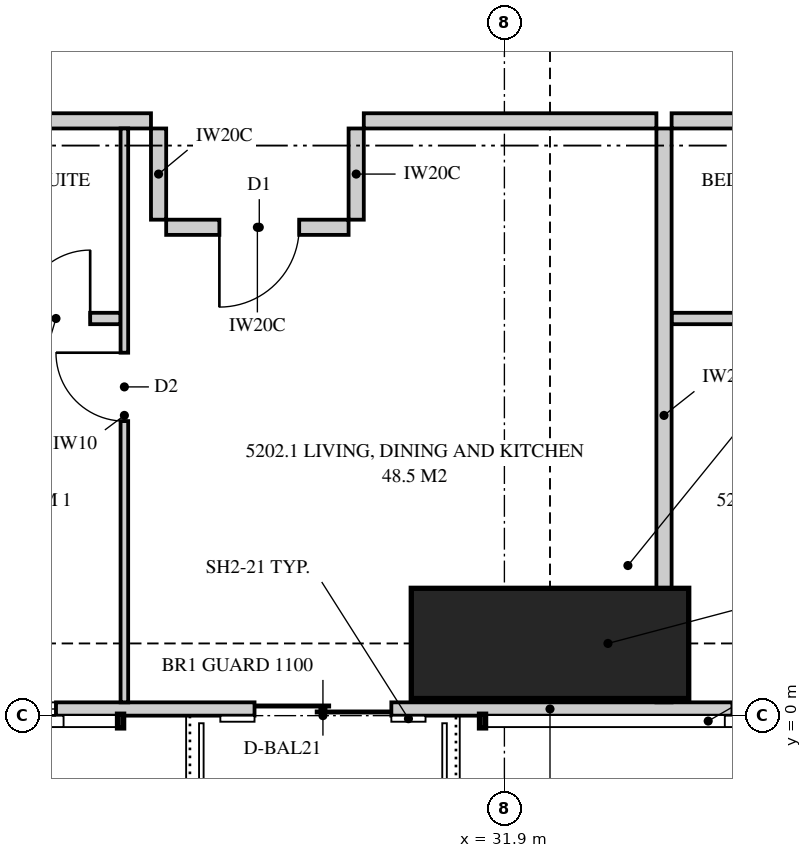
"""IFC4 building model, lengths in metres.
Left out: names, types, materials, properties, quantities, classifications, styles, units other than length and angle.
Written with IfcOpenShell. Run it as: python <this file> out.ifc"""

import sys

from ifc_helpers import new_model, si_unit, direction, frame, frame_2d, origin, origin_2d, place, context, subcontext, project, spatial, polyline, rectangle, outline, extrude, element, fill, save


model = new_model("IFC4")
c1 = context("Model", 3, precision=1e-05, world=origin(), true_north=direction((0.0, 1.0)))
c2 = subcontext(c1, "Body", "Model", "MODEL_VIEW")
j1 = project(units=[si_unit("LENGTHUNIT", "METRE"), si_unit("PLANEANGLEUNIT", "RADIAN")], contexts=[c1])
p1 = place(None, origin())
s1 = spatial("IfcSite", under=j1, at=p1, CompositionType="ELEMENT")
p2 = place(p1, origin())
s2 = spatial("IfcBuilding", under=s1, at=p2, CompositionType="ELEMENT")
p3 = place(p2, frame((0.0, 0.0, 191.2)))
s3 = spatial("IfcBuildingStorey", under=s2, at=p3, CompositionType="ELEMENT", Elevation=191.2)
p4 = place(p3, frame((32.5, 0.95, 0.0), z_axis=(0.0, 0.0, 1.0), x_axis=(0.0, 1.0, 0.0)))
e1 = element("IfcColumn", 1, at=p4, inside=s3, PredefinedType="COLUMN", context=c2, shape_type="SweptSolid", body=[
    extrude(rectangle(XDim=1.45, YDim=3.65, at=origin_2d()), origin(), (0.0, 0.0, 1.0), 3.35),
])
p5 = place(p3, frame((15.051, 0.087, 0.0), z_axis=(0.0, 0.0, 1.0), x_axis=(1.0, 0.0, 0.0)))
e2 = element("IfcWall", 2, at=p5, inside=s3, PredefinedType="SOLIDWALL", context=c2, shape_type="SweptSolid", body=[
    extrude(outline(polyline([(0.0, 0.0), (34.897, 0.0), (34.897, 3.11), (27.91, 3.11), (27.91, 2.15), (27.836, 2.15), (27.836, 3.11), (27.699, 3.11), (27.699, 2.15), (7.199, 2.15), (7.199, 3.11), (7.062, 3.11), (7.062, 2.15), (6.987, 2.15), (6.987, 3.11), (0.0, 3.11), (0.0, 0.0)])), frame((0.0, 0.087, 0.0), z_axis=(0.0, -1.0, 0.0), x_axis=(1.0, 0.0, 0.0)), (0.0, 0.0, 1.0), 0.175),
])
p6 = place(p5, frame((2.84, 0.0, 0.4)))
e3 = element("IfcOpeningElement", 3, at=p6, cuts=e2, PredefinedType="OPENING", context=c2, shape_type="SweptSolid", body=[
    extrude(rectangle(XDim=2.4, YDim=1.7, at=frame_2d((1.2, 0.85))), frame((0.0, 0.097, 0.0), z_axis=(0.0, -1.0, 0.0), x_axis=(1.0, 0.0, 0.0)), (0.0, 0.0, 1.0), 0.195),
])
p7 = place(p5, frame((9.149, 0.0, 0.4)))
e4 = element("IfcOpeningElement", 4, at=p7, cuts=e2, PredefinedType="OPENING", context=c2, shape_type="SweptSolid", body=[
    extrude(rectangle(XDim=1.8, YDim=1.7, at=frame_2d((0.9, 0.85))), frame((0.0, 0.097, 0.0), z_axis=(0.0, -1.0, 0.0), x_axis=(1.0, 0.0, 0.0)), (0.0, 0.0, 1.0), 0.195),
])
p8 = place(p5, frame((13.561, 0.0, 0.0)))
e5 = element("IfcOpeningElement", 5, at=p8, cuts=e2, PredefinedType="OPENING", context=c2, shape_type="SweptSolid", body=[
    extrude(rectangle(XDim=1.8, YDim=2.1, at=frame_2d((0.9, 1.05))), frame((0.0, 0.097, 0.0), z_axis=(0.0, -1.0, 0.0), x_axis=(1.0, 0.0, 0.0)), (0.0, 0.0, 1.0), 0.195),
])
p9 = place(p5, frame((19.849, 0.0, 0.4)))
e6 = element("IfcOpeningElement", 6, at=p9, cuts=e2, PredefinedType="OPENING", context=c2, shape_type="SweptSolid", body=[
    extrude(rectangle(XDim=1.8, YDim=1.7, at=frame_2d((0.9, 0.85))), frame((0.0, 0.097, 0.0), z_axis=(0.0, -1.0, 0.0), x_axis=(1.0, 0.0, 0.0)), (0.0, 0.0, 1.0), 0.195),
])
p10 = place(p5, frame((23.449, 0.0, 0.4)))
e7 = element("IfcOpeningElement", 7, at=p10, cuts=e2, PredefinedType="OPENING", context=c2, shape_type="SweptSolid", body=[
    extrude(rectangle(XDim=1.8, YDim=1.7, at=frame_2d((0.9, 0.85))), frame((0.0, 0.097, 0.0), z_axis=(0.0, -1.0, 0.0), x_axis=(1.0, 0.0, 0.0)), (0.0, 0.0, 1.0), 0.195),
])
p11 = place(p5, frame((29.636, 0.0, 0.4)))
e8 = element("IfcOpeningElement", 8, at=p11, cuts=e2, PredefinedType="OPENING", context=c2, shape_type="SweptSolid", body=[
    extrude(rectangle(XDim=1.8, YDim=1.7, at=frame_2d((0.9, 0.85))), frame((0.0, 0.097, 0.0), z_axis=(0.0, -1.0, 0.0), x_axis=(1.0, 0.0, 0.0)), (0.0, 0.0, 1.0), 0.195),
])
p12 = place(p5, frame((32.56, 0.0, 0.4)))
e9 = element("IfcOpeningElement", 9, at=p12, cuts=e2, PredefinedType="OPENING", context=c2, shape_type="SweptSolid", body=[
    extrude(rectangle(XDim=1.8, YDim=1.7, at=frame_2d((0.9, 0.85))), frame((0.0, 0.097, 0.0), z_axis=(0.0, -1.0, 0.0), x_axis=(1.0, 0.0, 0.0)), (0.0, 0.0, 1.0), 0.195),
])
p13 = place(p3, frame((34.0, 0.175, 0.0), z_axis=(0.0, 0.0, 1.0), x_axis=(0.0, 1.0, 0.0)))
e10 = element("IfcWall", 10, at=p13, inside=s3, PredefinedType="PARTITIONING", context=c2, shape_type="SweptSolid", body=[
    extrude(outline(polyline([(0.0, 0.0), (7.55, 0.0), (7.55, 3.11), (1.685, 3.11), (1.685, 2.15), (0.0, 2.15), (0.0, 3.11), (0.0, 0.0)])), frame((0.0, 0.1, 0.0), z_axis=(0.0, -1.0, 0.0), x_axis=(1.0, 0.0, 0.0)), (0.0, 0.0, 1.0), 0.2),
])
p14 = place(p3, frame((23.4, 7.825, 0.0), z_axis=(0.0, 0.0, 1.0), x_axis=(1.0, 0.0, 0.0)))
e11 = element("IfcWall", 11, at=p14, inside=s3, PredefinedType="PARTITIONING", context=c2, shape_type="SweptSolid", body=[
    extrude(rectangle(XDim=3.85, YDim=0.2, at=frame_2d((1.925, 0.0))), origin(), (0.0, 0.0, 1.0), 3.11),
])
p15 = place(p3, frame((26.9, 0.175, 0.0), z_axis=(0.0, 0.0, 1.0), x_axis=(0.0, 1.0, 0.0)))
e12 = element("IfcWall", 12, at=p15, inside=s3, PredefinedType="PARTITIONING", context=c2, shape_type="SweptSolid", body=[
    extrude(outline(polyline([(0.0, 0.0), (7.55, 0.0), (7.55, 3.11), (1.635, 3.11), (1.635, 2.15), (0.0, 2.15), (0.0, 3.11), (0.0, 0.0)])), frame((0.0, 0.05, 0.0), z_axis=(0.0, -1.0, 0.0), x_axis=(1.0, 0.0, 0.0)), (0.0, 0.0, 1.0), 0.1),
])
p16 = place(p15, frame((3.7, 0.0, 0.0)))
e13 = element("IfcOpeningElement", 13, at=p16, cuts=e12, PredefinedType="OPENING", context=c2, shape_type="SweptSolid", body=[
    extrude(rectangle(XDim=0.9, YDim=2.1, at=frame_2d((0.45, 1.05))), frame((0.0, 0.06, 0.0), z_axis=(0.0, -1.0, 0.0), x_axis=(1.0, 0.0, 0.0)), (0.0, 0.0, 1.0), 0.12),
])
p17 = place(p3, frame((23.4, 5.225, 0.0), z_axis=(0.0, 0.0, 1.0), x_axis=(1.0, 0.0, 0.0)))
e14 = element("IfcWall", 14, at=p17, inside=s3, PredefinedType="PLUMBINGWALL", context=c2, shape_type="SweptSolid", body=[
    extrude(rectangle(XDim=3.45, YDim=0.15, at=frame_2d((1.725, 0.0))), origin(), (0.0, 0.0, 1.0), 3.11),
])
p18 = place(p17, frame((2.15, 0.0, 0.0)))
e15 = element("IfcOpeningElement", 15, at=p18, cuts=e14, PredefinedType="OPENING", context=c2, shape_type="SweptSolid", body=[
    extrude(rectangle(XDim=0.9, YDim=2.1, at=frame_2d((0.45, 1.05))), frame((0.0, 0.085, 0.0), z_axis=(0.0, -1.0, 0.0), x_axis=(1.0, 0.0, 0.0)), (0.0, 0.0, 1.0), 0.17),
])
p19 = place(p3, frame((34.1, 7.825, 0.0), z_axis=(0.0, 0.0, 1.0), x_axis=(1.0, 0.0, 0.0)))
e16 = element("IfcWall", 16, at=p19, inside=s3, PredefinedType="PARTITIONING", context=c2, shape_type="SweptSolid", body=[
    extrude(outline(polyline([(0.0, 0.0), (11.85, 0.0), (11.85, 3.11), (8.987, 3.11), (8.987, 2.541), (8.312, 2.541), (8.312, 3.11), (0.0, 3.11), (0.0, 0.0)])), frame((0.0, 0.1, 0.0), z_axis=(0.0, -1.0, 0.0), x_axis=(1.0, 0.0, 0.0)), (0.0, 0.0, 1.0), 0.2),
])
p20 = place(p19, frame((8.9, 0.0, 0.0)))
e17 = element("IfcOpeningElement", 17, at=p20, cuts=e16, PredefinedType="OPENING", context=c2, shape_type="SweptSolid", body=[
    extrude(rectangle(XDim=1.05, YDim=2.2, at=frame_2d((0.525, 1.1))), frame((0.0, 0.11, 0.0), z_axis=(0.0, -1.0, 0.0), x_axis=(1.0, 0.0, 0.0)), (0.0, 0.0, 1.0), 0.22),
])
p21 = place(p3, frame((34.1, 5.225, 0.0), z_axis=(0.0, 0.0, 1.0), x_axis=(1.0, 0.0, 0.0)))
e18 = element("IfcWall", 18, at=p21, inside=s3, PredefinedType="PLUMBINGWALL", context=c2, shape_type="SweptSolid", body=[
    extrude(rectangle(XDim=3.45, YDim=0.15, at=frame_2d((1.725, 0.0))), origin(), (0.0, 0.0, 1.0), 3.11),
])
p22 = place(p21, frame((2.15, 0.0, 0.0)))
e19 = element("IfcOpeningElement", 19, at=p22, cuts=e18, PredefinedType="OPENING", context=c2, shape_type="SweptSolid", body=[
    extrude(rectangle(XDim=0.9, YDim=2.1, at=frame_2d((0.45, 1.05))), frame((0.0, 0.085, 0.0), z_axis=(0.0, -1.0, 0.0), x_axis=(1.0, 0.0, 0.0)), (0.0, 0.0, 1.0), 0.17),
])
p23 = place(p3, frame((30.05, 7.825, 0.0), z_axis=(0.0, 0.0, 1.0), x_axis=(1.0, 0.0, 0.0)))
e20 = element("IfcWall", 20, at=p23, inside=s3, PredefinedType="PARTITIONING", context=c2, shape_type="SweptSolid", body=[
    extrude(outline(polyline([(0.0, 0.0), (3.85, 0.0), (3.85, 3.11), (2.787, 3.11), (2.787, 2.541), (2.113, 2.541), (2.113, 3.11), (0.0, 3.11), (0.0, 0.0)])), frame((0.0, 0.1, 0.0), z_axis=(0.0, -1.0, 0.0), x_axis=(1.0, 0.0, 0.0)), (0.0, 0.0, 1.0), 0.2),
])
p24 = place(p3, frame((27.45, 6.425, 0.0), z_axis=(0.0, 0.0, 1.0), x_axis=(1.0, 0.0, 0.0)))
e21 = element("IfcWall", 21, at=p24, inside=s3, PredefinedType="PARTITIONING", context=c2, shape_type="SweptSolid", body=[
    extrude(rectangle(XDim=2.4, YDim=0.2, at=frame_2d((1.2, 0.0))), origin(), (0.0, 0.0, 1.0), 3.11),
])
p25 = place(p24, frame((0.7, 0.0, 0.0)))
e22 = element("IfcOpeningElement", 22, at=p25, cuts=e21, PredefinedType="OPENING", context=c2, shape_type="SweptSolid", body=[
    extrude(rectangle(XDim=1.05, YDim=2.2, at=frame_2d((0.525, 1.1))), frame((0.0, 0.11, 0.0), z_axis=(0.0, -1.0, 0.0), x_axis=(1.0, 0.0, 0.0)), (0.0, 0.0, 1.0), 0.22),
])
for number, where, z_axis, x_axis in (
    (23, (27.35, 7.725, 0.0), (0.0, 0.0, 1.0), (0.0, -1.0, 0.0)),
    (24, (29.95, 7.725, 0.0), (0.0, 0.0, 1.0), (0.0, -1.0, 0.0)),
):
    element("IfcWall", number, at=place(p3, frame(where, z_axis=z_axis, x_axis=x_axis)), inside=s3, PredefinedType="PARTITIONING", context=c2, shape_type="SweptSolid", body=[
        extrude(rectangle(XDim=1.2, YDim=0.2, at=frame_2d((0.6, 0.0))), origin(), (0.0, 0.0, 1.0), 3.11),
    ])
p26 = place(p7, origin())
e25 = element("IfcWindow", 25, at=p26, inside=s3, PartitioningType="SINGLE_PANEL", PredefinedType="WINDOW", context=c2, shape_type="SweptSolid", body=[
    extrude(rectangle(XDim=1.8, YDim=1.7, at=frame_2d((0.9, 0.85))), frame((0.0, 0.03, 0.0), z_axis=(0.0, -1.0, 0.0), x_axis=(1.0, 0.0, 0.0)), (0.0, 0.0, 1.0), 0.06),
])
fill(e4, e25)
p27 = place(p8, origin())
e26 = element("IfcDoor", 26, at=p27, inside=s3, OperationType="SLIDING_TO_LEFT", PredefinedType="DOOR", context=c2, shape_type="SweptSolid", body=[
    extrude(rectangle(XDim=1.8, YDim=2.1, at=frame_2d((0.9, 1.05))), frame((0.0, 0.025, 0.0), z_axis=(0.0, -1.0, 0.0), x_axis=(1.0, 0.0, 0.0)), (0.0, 0.0, 1.0), 0.05),
])
fill(e5, e26)
p28 = place(p9, origin())
e27 = element("IfcWindow", 27, at=p28, inside=s3, PartitioningType="SINGLE_PANEL", PredefinedType="WINDOW", context=c2, shape_type="SweptSolid", body=[
    extrude(rectangle(XDim=1.8, YDim=1.7, at=frame_2d((0.9, 0.85))), frame((0.0, 0.03, 0.0), z_axis=(0.0, -1.0, 0.0), x_axis=(1.0, 0.0, 0.0)), (0.0, 0.0, 1.0), 0.06),
])
fill(e6, e27)
p29 = place(p25, frame((1.05, 0.0, 0.0), z_axis=(0.0, 0.0, 1.0), x_axis=(-1.0, 0.0, 0.0)))
e28 = element("IfcDoor", 28, at=p29, inside=s3, OperationType="SINGLE_SWING_RIGHT", PredefinedType="DOOR", context=c2, shape_type="SweptSolid", body=[
    extrude(rectangle(XDim=1.05, YDim=2.2, at=frame_2d((0.525, 1.1))), frame((0.0, 0.025, 0.0), z_axis=(0.0, -1.0, 0.0), x_axis=(1.0, 0.0, 0.0)), (0.0, 0.0, 1.0), 0.05),
])
fill(e22, e28)
p30 = place(p16, origin())
e29 = element("IfcDoor", 29, at=p30, inside=s3, OperationType="SINGLE_SWING_RIGHT", PredefinedType="DOOR", context=c2, shape_type="SweptSolid", body=[
    extrude(rectangle(XDim=0.9, YDim=2.1, at=frame_2d((0.45, 1.05))), frame((0.0, 0.025, 0.0), z_axis=(0.0, -1.0, 0.0), x_axis=(1.0, 0.0, 0.0)), (0.0, 0.0, 1.0), 0.05),
])
fill(e13, e29)
p31 = place(p18, origin())
e30 = element("IfcDoor", 30, at=p31, inside=s3, OperationType="SINGLE_SWING_RIGHT", PredefinedType="DOOR", context=c2, shape_type="SweptSolid", body=[
    extrude(rectangle(XDim=0.9, YDim=2.1, at=frame_2d((0.45, 1.05))), frame((0.0, 0.025, 0.0), z_axis=(0.0, -1.0, 0.0), x_axis=(1.0, 0.0, 0.0)), (0.0, 0.0, 1.0), 0.05),
])
fill(e15, e30)
save(model, sys.argv[1])
